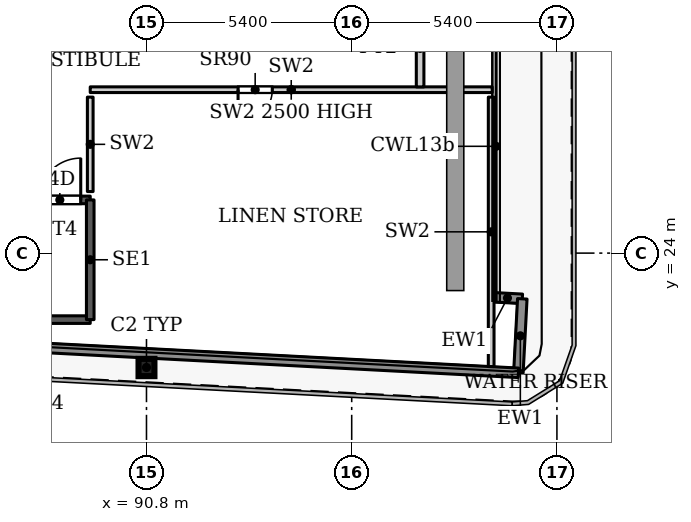
"""IFC4 building model, lengths in metres.
Left out: names, types, materials, properties, quantities, classifications, styles, units other than length and angle.
Written with IfcOpenShell. Run it as: python <this file> out.ifc"""

import sys

from ifc_helpers import new_model, si_unit, direction, frame, frame_2d, origin, origin_2d, place, context, subcontext, project, spatial, rectangle, i_section, extrude, source, transform, mapped, element, fill, save


model = new_model("IFC4")
c1 = context("Model", 3, precision=1e-05, world=origin(), true_north=direction((0.0, 1.0)))
c2 = subcontext(c1, "Body", "Model", "MODEL_VIEW")
j1 = project(units=[si_unit("LENGTHUNIT", "METRE"), si_unit("PLANEANGLEUNIT", "RADIAN")], contexts=[c1])
p1 = place(None, origin())
s1 = spatial("IfcSite", under=j1, at=p1, CompositionType="ELEMENT")
p2 = place(p1, origin())
s2 = spatial("IfcBuilding", under=s1, at=p2, CompositionType="ELEMENT")
p3 = place(p2, frame((0.0, 0.0, 121.4)))
s3 = spatial("IfcBuildingStorey", under=s2, at=p3, CompositionType="ELEMENT", Elevation=121.4)
p4 = place(p3, frame((90.8, 20.99, 0.0), z_axis=(0.0, 0.0, 1.0), x_axis=(1.0, 0.0, 0.0)))
e1 = element("IfcColumn", 1, at=p4, inside=s3, PredefinedType="COLUMN", context=c2, shape_type="SweptSolid", body=[
    extrude(i_section(OverallWidth=0.418, OverallDepth=0.455, WebThickness=0.042, FlangeThickness=0.068, FilletRadius=0.014, at=origin_2d()), origin(), (0.0, 0.0, 1.0), 3.9),
])
p5 = place(p3, frame((99.907, 22.839, 0.0), z_axis=(0.0, 0.0, 1.0), x_axis=(0.998561284263, -0.053622398031, 0.0)))
e2 = element("IfcWall", 2, at=p5, inside=s3, PredefinedType="SOLIDWALL", context=c2, shape_type="SweptSolid", body=[
    extrude(rectangle(XDim=0.783, YDim=0.25, at=frame_2d((0.392, 0.0))), origin(), (0.0, 0.0, 1.0), 3.75),
])
p6 = place(p3, frame((100.689, 22.797, 0.0), z_axis=(0.0, 0.0, 1.0), x_axis=(-0.052841433274, -0.998602915542, 0.0)))
e3 = element("IfcWall", 3, at=p6, inside=s3, PredefinedType="SOLIDWALL", context=c2, shape_type="SweptSolid", body=[
    extrude(rectangle(XDim=1.95, YDim=0.25, at=frame_2d((0.975, 0.0))), origin(), (0.0, 0.0, 1.0), 3.75),
])
p7 = place(p3, frame((100.586, 20.85, 0.0), z_axis=(0.0, 0.0, 1.0), x_axis=(-0.99861746497, 0.052565755559, 0.0)))
e4 = element("IfcWall", 4, at=p7, inside=s3, PredefinedType="SOLIDWALL", context=c2, shape_type="SweptSolid", body=[
    extrude(rectangle(XDim=66.639, YDim=0.25, at=frame_2d((33.319, 0.0))), origin(), (0.0, 0.0, 1.0), 3.75),
])
p8 = place(p3, frame((80.16, 22.25, 0.0), z_axis=(0.0, 0.0, 1.0), x_axis=(1.0, 0.0, 0.0)))
e5 = element("IfcWall", 5, at=p8, inside=s3, PredefinedType="SHEAR", context=c2, shape_type="SweptSolid", body=[
    extrude(rectangle(XDim=9.16, YDim=0.2, at=frame_2d((4.58, 0.0))), origin(), (0.0, 0.0, 1.0), 3.9),
])
p9 = place(p3, frame((80.16, 25.4, 0.0), z_axis=(0.0, 0.0, 1.0), x_axis=(1.0, 0.0, 0.0)))
e6 = element("IfcWall", 6, at=p9, inside=s3, PredefinedType="SHEAR", context=c2, shape_type="SweptSolid", body=[
    extrude(rectangle(XDim=9.16, YDim=0.2, at=frame_2d((4.58, 0.0))), origin(), (0.0, 0.0, 1.0), 3.9),
])
p10 = place(p9, frame((7.81, 0.0, 0.0)))
e7 = element("IfcOpeningElement", 7, at=p10, cuts=e6, PredefinedType="OPENING", context=c2, shape_type="SweptSolid", body=[
    extrude(rectangle(XDim=1.1, YDim=2.2, at=frame_2d((0.55, 1.1))), frame((0.0, 0.11, 0.0), z_axis=(0.0, -1.0, 0.0), x_axis=(1.0, 0.0, 0.0)), (0.0, 0.0, 1.0), 0.22),
])
p11 = place(p3, frame((89.32, 22.25, 0.0), z_axis=(0.0, 0.0, 1.0), x_axis=(0.0, 1.0, 0.0)))
e8 = element("IfcWall", 8, at=p11, inside=s3, PredefinedType="SHEAR", context=c2, shape_type="SweptSolid", body=[
    extrude(rectangle(XDim=3.15, YDim=0.2, at=frame_2d((1.575, 0.0))), origin(), (0.0, 0.0, 1.0), 3.9),
])
p12 = place(p3, frame((89.32, 28.3, 0.0), z_axis=(0.0, 0.0, 1.0), x_axis=(1.0, 0.0, 0.0)))
e9 = element("IfcWall", 9, at=p12, inside=s3, PredefinedType="PARTITIONING", context=c2, shape_type="SweptSolid", body=[
    extrude(rectangle(XDim=10.578, YDim=0.15, at=frame_2d((5.289, 0.0))), origin(), (0.0, 0.0, 1.0), 2.5),
])
p13 = place(p12, frame((3.89, 0.0, 0.0)))
e10 = element("IfcOpeningElement", 10, at=p13, cuts=e9, PredefinedType="OPENING", context=c2, shape_type="SweptSolid", body=[
    extrude(rectangle(XDim=0.9, YDim=2.2, at=frame_2d((0.45, 1.1))), frame((0.0, 0.085, 0.0), z_axis=(0.0, -1.0, 0.0), x_axis=(1.0, 0.0, 0.0)), (0.0, 0.0, 1.0), 0.17),
])
p14 = place(p3, frame((89.32, 25.62, 0.0), z_axis=(0.0, 0.0, 1.0), x_axis=(0.0, 1.0, 0.0)))
e11 = element("IfcWall", 11, at=p14, inside=s3, PredefinedType="PARTITIONING", context=c2, shape_type="SweptSolid", body=[
    extrude(rectangle(XDim=2.485, YDim=0.15, at=frame_2d((1.242, 0.0))), origin(), (0.0, 0.0, 1.0), 3.9),
])
p15 = place(p3, frame((99.87, 21.015, 0.0), z_axis=(0.0, 0.0, 1.0), x_axis=(0.0, 1.0, 0.0)))
e12 = element("IfcWall", 12, at=p15, inside=s3, PredefinedType="PARTITIONING", context=c2, shape_type="SweptSolid", body=[
    extrude(rectangle(XDim=7.09, YDim=0.15, at=frame_2d((3.545, 0.0))), origin(), (0.0, 0.0, 1.0), 3.9),
])
p16 = place(p3, frame((98.0, 28.374, 0.0), z_axis=(0.0, 0.0, 1.0), x_axis=(0.0, 1.0, 0.0)))
e13 = element("IfcWall", 13, at=p16, inside=s3, PredefinedType="PARTITIONING", context=c2, shape_type="SweptSolid", body=[
    extrude(rectangle(XDim=2.026, YDim=0.2, at=frame_2d((1.013, 0.0))), origin(), (0.0, 0.0, 1.0), 3.6),
])
m1 = source(origin(), c2, "Body", "SweptSolid", [
    extrude(rectangle(XDim=0.9, YDim=2.2, at=frame_2d((0.45, 1.1))), frame((0.0, 0.025, 0.0), z_axis=(0.0, -1.0, 0.0), x_axis=(1.0, 0.0, 0.0)), (0.0, 0.0, 1.0), 0.05),
])
p17 = place(p13, origin())
e14 = element("IfcDoor", 14, at=p17, inside=s3, OperationType="SINGLE_SWING_RIGHT", PredefinedType="DOOR", context=c2, shape_type="MappedRepresentation", body=[
    mapped(m1, transform((0.0, 0.0, 0.0), x_axis=(1.0, 0.0, 0.0), y_axis=(0.0, 1.0, 0.0), z_axis=(0.0, 0.0, 1.0), scale=1.0)),
])
fill(e10, e14)
m2 = source(origin(), c2, "Body", "SweptSolid", [
    extrude(rectangle(XDim=1.1, YDim=2.2, at=frame_2d((0.55, 1.1))), frame((0.0, 0.025, 0.0), z_axis=(0.0, -1.0, 0.0), x_axis=(1.0, 0.0, 0.0)), (0.0, 0.0, 1.0), 0.05),
])
p18 = place(p10, origin())
e15 = element("IfcDoor", 15, at=p18, inside=s3, OperationType="SINGLE_SWING_LEFT", PredefinedType="DOOR", context=c2, shape_type="MappedRepresentation", body=[
    mapped(m2, transform((0.0, 0.0, 0.0), x_axis=(1.0, 0.0, 0.0), y_axis=(0.0, 1.0, 0.0), z_axis=(0.0, 0.0, 1.0), scale=1.0)),
])
fill(e7, e15)
save(model, sys.argv[1])
